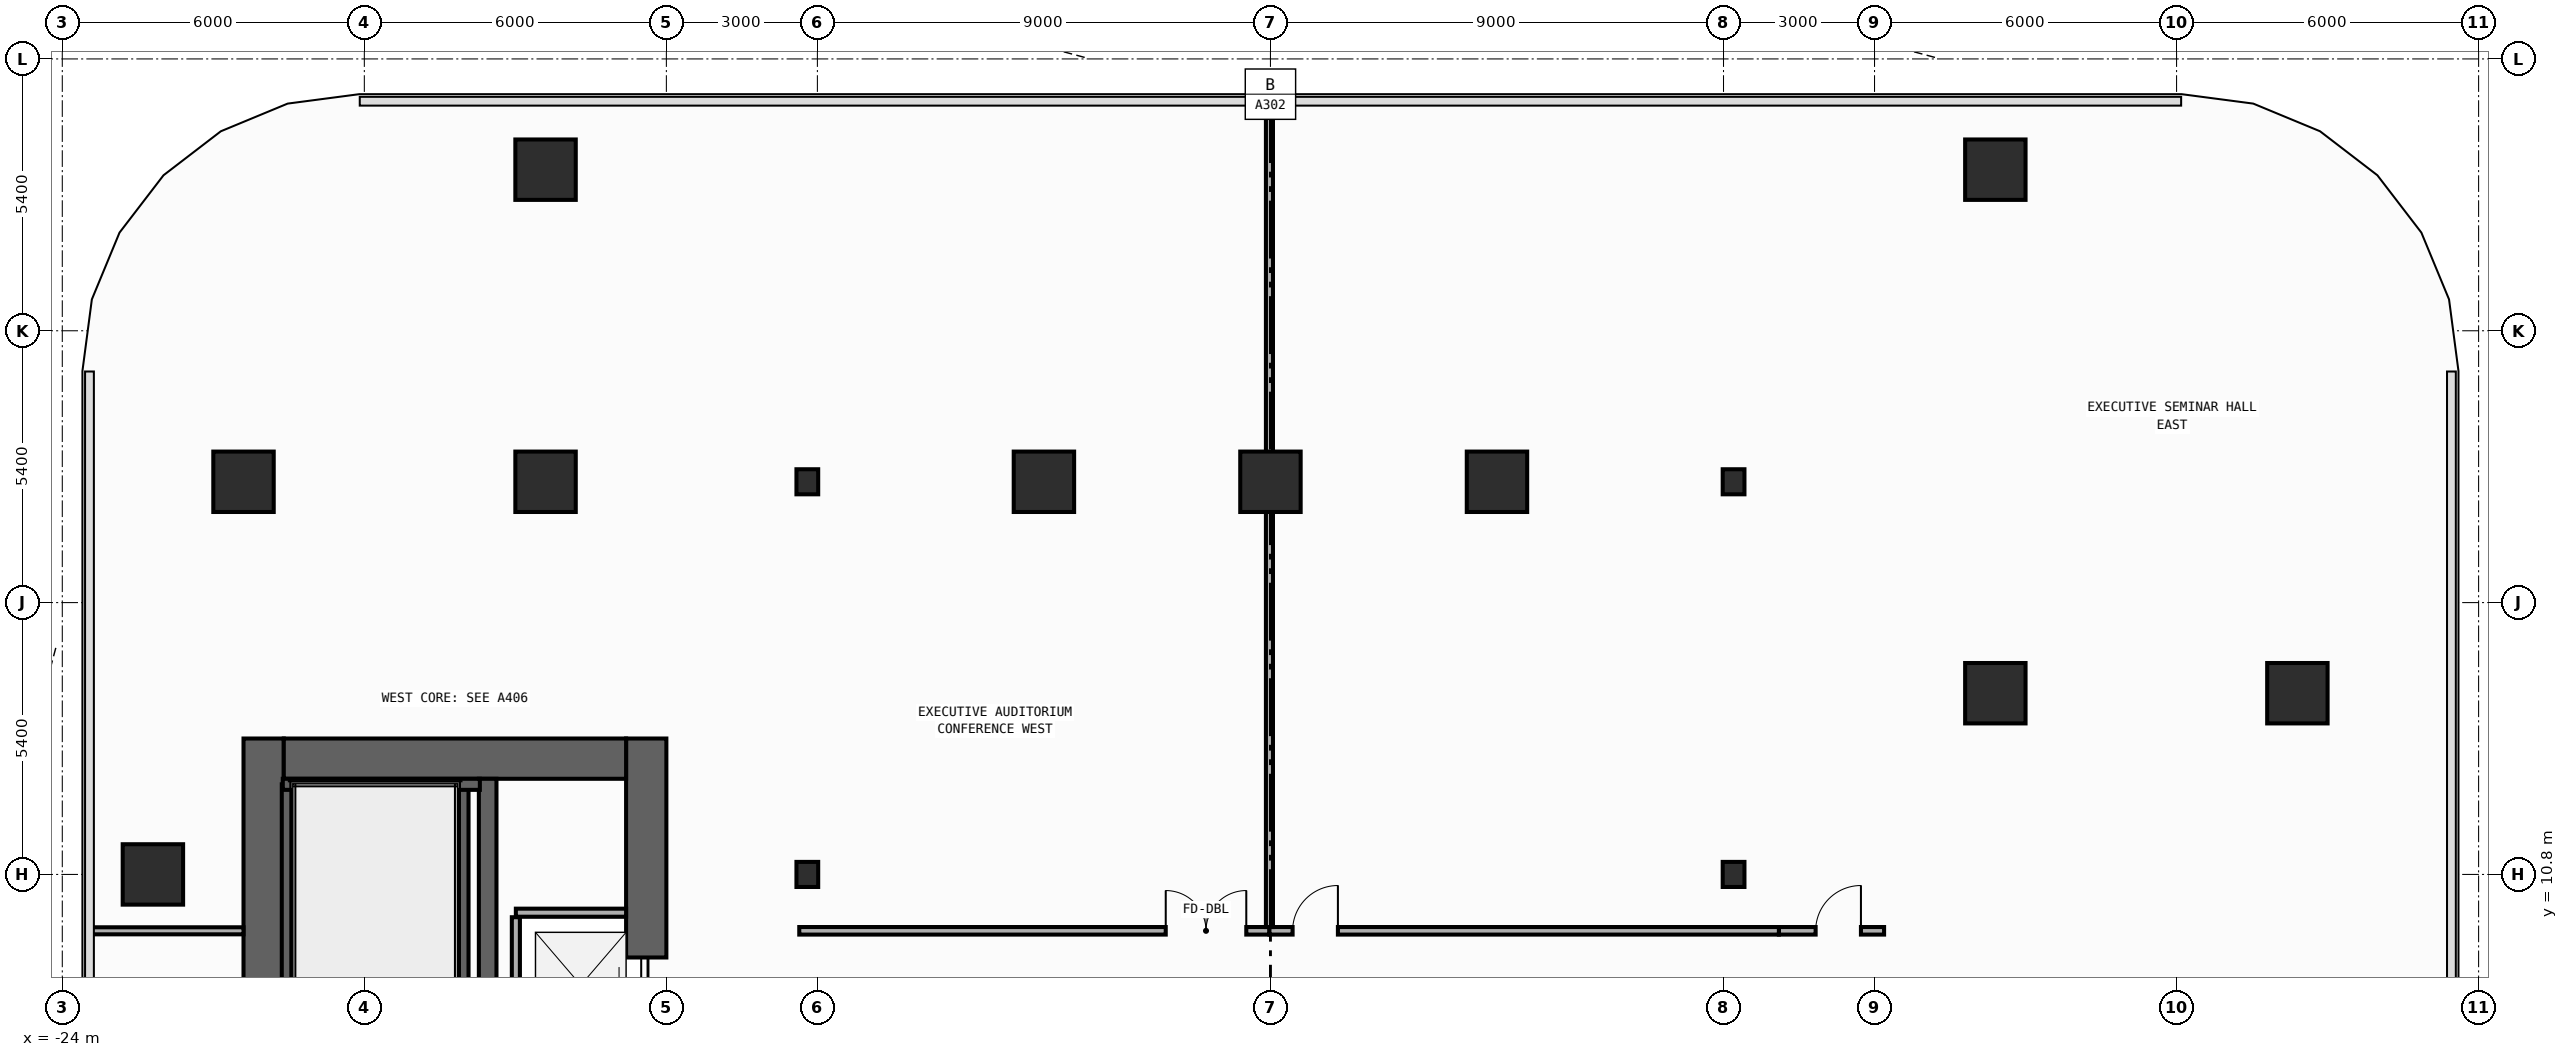
"""IFC4 building model, lengths in metres.
Left out: names, types, materials, properties, quantities, classifications, styles, units other than length and angle.
Written with IfcOpenShell. Run it as: python <this file> out.ifc"""

import sys

from ifc_helpers import new_model, si_unit, direction, frame, frame_2d, origin, origin_2d, place, context, subcontext, project, spatial, rectangle, i_section, extrude, element, fill, save


model = new_model("IFC4")
c1 = context("Model", 3, precision=1e-05, world=origin(), true_north=direction((0.0, 1.0)))
c2 = subcontext(c1, "Body", "Model", "MODEL_VIEW")
j1 = project(units=[si_unit("LENGTHUNIT", "METRE"), si_unit("PLANEANGLEUNIT", "RADIAN")], contexts=[c1])
p1 = place(None, origin())
s1 = spatial("IfcSite", under=j1, at=p1, CompositionType="ELEMENT")
p2 = place(p1, origin())
s2 = spatial("IfcBuilding", under=s1, at=p2, CompositionType="ELEMENT")
p3 = place(p2, frame((0.0, 0.0, 93.2)))
s3 = spatial("IfcBuildingStorey", under=s2, at=p3, CompositionType="ELEMENT", Elevation=93.2)
p4 = place(p3, frame((-20.0, -13.5, 0.0), z_axis=(0.0, 0.0, 1.0), x_axis=(0.0, 1.0, 0.0)))
e1 = element("IfcWall", 1, at=p4, inside=s3, PredefinedType="SHEAR", context=c2, shape_type="SweptSolid", body=[
    extrude(rectangle(XDim=27.0, YDim=0.8, at=frame_2d((13.5, 0.0))), origin(), (0.0, 0.0, 1.0), 3.94),
])
p5 = place(p3, frame((-12.4, -13.5, 0.0), z_axis=(0.0, 0.0, 1.0), x_axis=(0.0, 1.0, 0.0)))
e2 = element("IfcWall", 2, at=p5, inside=s3, PredefinedType="SHEAR", context=c2, shape_type="SweptSolid", body=[
    extrude(rectangle(XDim=27.0, YDim=0.8, at=frame_2d((13.5, 0.0))), origin(), (0.0, 0.0, 1.0), 3.94),
])
p6 = place(p5, frame((21.55, 0.0, 0.0)))
e3 = element("IfcOpeningElement", 3, at=p6, cuts=e2, PredefinedType="OPENING", context=c2, shape_type="SweptSolid", body=[
    extrude(rectangle(XDim=1.1, YDim=2.2, at=frame_2d((0.55, 1.1))), frame((0.0, 0.41, 0.0), z_axis=(0.0, -1.0, 0.0), x_axis=(1.0, 0.0, 0.0)), (0.0, 0.0, 1.0), 0.82),
])
p7 = place(p5, frame((18.35, 0.0, 0.0)))
e4 = element("IfcOpeningElement", 4, at=p7, cuts=e2, PredefinedType="OPENING", context=c2, shape_type="SweptSolid", body=[
    extrude(rectangle(XDim=1.1, YDim=2.2, at=frame_2d((0.55, 1.1))), frame((0.0, 0.41, 0.0), z_axis=(0.0, -1.0, 0.0), x_axis=(1.0, 0.0, 0.0)), (0.0, 0.0, 1.0), 0.82),
])
p8 = place(p5, frame((15.15, 0.0, 0.0)))
e5 = element("IfcOpeningElement", 5, at=p8, cuts=e2, PredefinedType="OPENING", context=c2, shape_type="SweptSolid", body=[
    extrude(rectangle(XDim=1.1, YDim=2.2, at=frame_2d((0.55, 1.1))), frame((0.0, 0.41, 0.0), z_axis=(0.0, -1.0, 0.0), x_axis=(1.0, 0.0, 0.0)), (0.0, 0.0, 1.0), 0.82),
])
p9 = place(p5, frame((10.35, 0.0, 0.0)))
e6 = element("IfcOpeningElement", 6, at=p9, cuts=e2, PredefinedType="OPENING", context=c2, shape_type="SweptSolid", body=[
    extrude(rectangle(XDim=1.1, YDim=2.2, at=frame_2d((0.55, 1.1))), frame((0.0, 0.41, 0.0), z_axis=(0.0, -1.0, 0.0), x_axis=(1.0, 0.0, 0.0)), (0.0, 0.0, 1.0), 0.82),
])
p10 = place(p5, frame((7.15, 0.0, 0.0)))
e7 = element("IfcOpeningElement", 7, at=p10, cuts=e2, PredefinedType="OPENING", context=c2, shape_type="SweptSolid", body=[
    extrude(rectangle(XDim=1.1, YDim=2.2, at=frame_2d((0.55, 1.1))), frame((0.0, 0.41, 0.0), z_axis=(0.0, -1.0, 0.0), x_axis=(1.0, 0.0, 0.0)), (0.0, 0.0, 1.0), 0.82),
])
p11 = place(p5, frame((3.95, 0.0, 0.0)))
e8 = element("IfcOpeningElement", 8, at=p11, cuts=e2, PredefinedType="OPENING", context=c2, shape_type="SweptSolid", body=[
    extrude(rectangle(XDim=1.1, YDim=2.2, at=frame_2d((0.55, 1.1))), frame((0.0, 0.41, 0.0), z_axis=(0.0, -1.0, 0.0), x_axis=(1.0, 0.0, 0.0)), (0.0, 0.0, 1.0), 0.82),
])
p12 = place(p5, frame((12.725, 0.0, 0.0)))
e9 = element("IfcOpeningElement", 9, at=p12, cuts=e2, PredefinedType="OPENING", context=c2, shape_type="SweptSolid", body=[
    extrude(rectangle(XDim=1.15, YDim=2.2, at=frame_2d((0.575, 1.1))), frame((0.0, 0.41, 0.0), z_axis=(0.0, -1.0, 0.0), x_axis=(1.0, 0.0, 0.0)), (0.0, 0.0, 1.0), 0.82),
])
p13 = place(p5, frame((1.625, 0.0, 0.0)))
e10 = element("IfcOpeningElement", 10, at=p13, cuts=e2, PredefinedType="OPENING", context=c2, shape_type="SweptSolid", body=[
    extrude(rectangle(XDim=0.85, YDim=2.1, at=frame_2d((0.425, 1.05))), frame((0.0, 0.41, 0.0), z_axis=(0.0, -1.0, 0.0), x_axis=(1.0, 0.0, 0.0)), (0.0, 0.0, 1.0), 0.82),
])
p14 = place(p3, frame((-19.6, 13.1, 0.0), z_axis=(0.0, 0.0, 1.0), x_axis=(1.0, 0.0, 0.0)))
e11 = element("IfcWall", 11, at=p14, inside=s3, PredefinedType="SHEAR", context=c2, shape_type="SweptSolid", body=[
    extrude(rectangle(XDim=6.8, YDim=0.8, at=frame_2d((3.4, 0.0))), origin(), (0.0, 0.0, 1.0), 3.94),
])
p15 = place(p3, frame((-15.55, -12.7, 0.0), z_axis=(0.0, 0.0, 1.0), x_axis=(0.0, 1.0, 0.0)))
e12 = element("IfcWall", 12, at=p15, inside=s3, PredefinedType="SHEAR", context=c2, shape_type="SweptSolid", body=[
    extrude(rectangle(XDim=25.4, YDim=0.35, at=frame_2d((12.7, 0.0))), origin(), (0.0, 0.0, 1.0), 3.94),
])
p16 = place(p15, frame((11.925, 0.0, 0.0)))
e13 = element("IfcOpeningElement", 13, at=p16, cuts=e12, PredefinedType="OPENING", context=c2, shape_type="SweptSolid", body=[
    extrude(rectangle(XDim=1.15, YDim=2.2, at=frame_2d((0.575, 1.1))), frame((0.0, 0.185, 0.0), z_axis=(0.0, -1.0, 0.0), x_axis=(1.0, 0.0, 0.0)), (0.0, 0.0, 1.0), 0.37),
])
p17 = place(p15, frame((0.825, 0.0, 0.0)))
e14 = element("IfcOpeningElement", 14, at=p17, cuts=e12, PredefinedType="OPENING", context=c2, shape_type="SweptSolid", body=[
    extrude(rectangle(XDim=0.85, YDim=2.1, at=frame_2d((0.425, 1.05))), frame((0.0, 0.185, 0.0), z_axis=(0.0, -1.0, 0.0), x_axis=(1.0, 0.0, 0.0)), (0.0, 0.0, 1.0), 0.37),
])
for number, where, z_axis, x_axis in (
    (15, (-16.04, 1.29, 0.0), (0.0, 0.0, 1.0), (0.0, 1.0, 0.0)),
    (16, (-19.53, 1.29, 0.0), (0.0, 0.0, 1.0), (0.0, 1.0, 0.0)),
):
    element("IfcWall", number, at=place(p3, frame(where, z_axis=z_axis, x_axis=x_axis)), inside=s3, PredefinedType="SHEAR", context=c2, shape_type="SweptSolid", body=[
        extrude(rectangle(XDim=11.3, YDim=0.22, at=frame_2d((5.65, 0.0))), origin(), (0.0, 0.0, 1.0), 3.94),
    ])
p18 = place(p3, frame((-19.62, 12.59, 0.0), z_axis=(0.0, 0.0, 1.0), x_axis=(1.0, 0.0, 0.0)))
e17 = element("IfcWall", 17, at=p18, inside=s3, PredefinedType="SHEAR", context=c2, shape_type="SweptSolid", body=[
    extrude(rectangle(XDim=3.915, YDim=0.22, at=frame_2d((1.958, 0.0))), origin(), (0.0, 0.0, 1.0), 3.94),
])
for number, where, z_axis, x_axis in (
    (18, (-9.2, 10.8, 0.0), (0.0, 0.0, 1.0), (1.0, 0.0, 0.0)),
    (19, (-9.2, 18.6, 0.0), (0.0, 0.0, 1.0), (1.0, 0.0, 0.0)),
    (20, (9.2, 10.8, 0.0), (0.0, 0.0, 1.0), (1.0, 0.0, 0.0)),
    (21, (9.2, 18.6, 0.0), (0.0, 0.0, 1.0), (1.0, 0.0, 0.0)),
):
    element("IfcColumn", number, at=place(p3, frame(where, z_axis=z_axis, x_axis=x_axis)), inside=s3, PredefinedType="COLUMN", context=c2, shape_type="SweptSolid", body=[
        extrude(i_section(OverallWidth=0.432, OverallDepth=0.498, WebThickness=0.045, FlangeThickness=0.07, FilletRadius=0.022, at=origin_2d()), origin(), (0.0, 0.0, 1.0), 4.2),
    ])
for number, where, z_axis, x_axis in (
    (22, (-20.4, 18.6, 0.0), (0.0, 0.0, 1.0), (1.0, 0.0, 0.0)),
    (23, (20.4, 14.4, 0.0), (0.0, 0.0, 1.0), (1.0, 0.0, 0.0)),
    (24, (-14.4, 18.6, 0.0), (0.0, 0.0, 1.0), (1.0, 0.0, 0.0)),
    (25, (14.4, 14.4, 0.0), (0.0, 0.0, 1.0), (1.0, 0.0, 0.0)),
    (26, (-4.5, 18.6, 0.0), (0.0, 0.0, 1.0), (1.0, 0.0, 0.0)),
    (27, (0.0, 18.6, 0.0), (0.0, 0.0, 1.0), (1.0, 0.0, 0.0)),
    (28, (4.5, 18.6, 0.0), (0.0, 0.0, 1.0), (1.0, 0.0, 0.0)),
    (29, (-22.2, 10.8, 0.0), (0.0, 0.0, 1.0), (1.0, 0.0, 0.0)),
    (30, (-14.4, 24.8, 0.0), (0.0, 0.0, 1.0), (1.0, 0.0, 0.0)),
    (31, (14.4, 24.8, 0.0), (0.0, 0.0, 1.0), (1.0, 0.0, 0.0)),
):
    element("IfcColumn", number, at=place(p3, frame(where, z_axis=z_axis, x_axis=x_axis)), inside=s3, PredefinedType="COLUMN", context=c2, shape_type="SweptSolid", body=[
        extrude(rectangle(XDim=1.2, YDim=1.2, at=origin_2d()), origin(), (0.0, 0.0, 1.0), 4.2),
    ])
p19 = place(p3, frame((-14.99, 10.04, 0.0), z_axis=(0.0, 0.0, 1.0), x_axis=(1.0, 0.0, 0.0)))
e32 = element("IfcWall", 32, at=p19, inside=s3, PredefinedType="STANDARD", context=c2, shape_type="SweptSolid", body=[
    extrude(rectangle(XDim=2.19, YDim=0.16, at=frame_2d((1.095, 0.0))), origin(), (0.0, 0.0, 1.0), 3.94),
])
p20 = place(p3, frame((-14.99, 7.25, 0.0), z_axis=(0.0, 0.0, 1.0), x_axis=(0.0, 1.0, 0.0)))
e33 = element("IfcWall", 33, at=p20, inside=s3, PredefinedType="STANDARD", context=c2, shape_type="SweptSolid", body=[
    extrude(rectangle(XDim=2.7, YDim=0.16, at=frame_2d((1.35, 0.0))), origin(), (0.0, 0.0, 1.0), 3.94),
])
p21 = place(p3, frame((10.1, 9.68, 0.0), z_axis=(0.0, 0.0, 1.0), x_axis=(1.0, 0.0, 0.0)))
e34 = element("IfcWall", 34, at=p21, inside=s3, PredefinedType="PARTITIONING", context=c2, shape_type="SweptSolid", body=[
    extrude(rectangle(XDim=2.09, YDim=0.15, at=frame_2d((1.045, 0.0))), origin(), (0.0, 0.0, 1.0), 3.94),
])
p22 = place(p21, frame((0.73, 0.0, 0.0)))
e35 = element("IfcOpeningElement", 35, at=p22, cuts=e34, PredefinedType="OPENING", context=c2, shape_type="SweptSolid", body=[
    extrude(rectangle(XDim=0.9, YDim=2.15, at=frame_2d((0.45, 1.075))), frame((0.0, 0.085, 0.0), z_axis=(0.0, -1.0, 0.0), x_axis=(1.0, 0.0, 0.0)), (0.0, 0.0, 1.0), 0.17),
])
p23 = place(p3, frame((-9.36, 9.68, 0.0), z_axis=(0.0, 0.0, 1.0), x_axis=(1.0, 0.0, 0.0)))
e36 = element("IfcWall", 36, at=p23, inside=s3, PredefinedType="PARTITIONING", context=c2, shape_type="SweptSolid", body=[
    extrude(rectangle(XDim=9.34, YDim=0.15, at=frame_2d((4.67, 0.0))), origin(), (0.0, 0.0, 1.0), 3.94),
])
p24 = place(p23, frame((7.28, 0.0, 0.0)))
e37 = element("IfcOpeningElement", 37, at=p24, cuts=e36, PredefinedType="OPENING", context=c2, shape_type="SweptSolid", body=[
    extrude(rectangle(XDim=1.6, YDim=2.25, at=frame_2d((0.8, 1.125))), frame((0.0, 0.085, 0.0), z_axis=(0.0, -1.0, 0.0), x_axis=(1.0, 0.0, 0.0)), (0.0, 0.0, 1.0), 0.17),
])
p25 = place(p3, frame((-0.02, 9.68, 0.0), z_axis=(0.0, 0.0, 1.0), x_axis=(1.0, 0.0, 0.0)))
e38 = element("IfcWall", 38, at=p25, inside=s3, PredefinedType="PARTITIONING", context=c2, shape_type="SweptSolid", body=[
    extrude(rectangle(XDim=10.12, YDim=0.15, at=frame_2d((5.06, 0.0))), origin(), (0.0, 0.0, 1.0), 3.94),
])
p26 = place(p25, frame((0.46, 0.0, 0.0)))
e39 = element("IfcOpeningElement", 39, at=p26, cuts=e38, PredefinedType="OPENING", context=c2, shape_type="SweptSolid", body=[
    extrude(rectangle(XDim=0.9, YDim=2.15, at=frame_2d((0.45, 1.075))), frame((0.0, 0.085, 0.0), z_axis=(0.0, -1.0, 0.0), x_axis=(1.0, 0.0, 0.0)), (0.0, 0.0, 1.0), 0.17),
])
p27 = place(p3, frame((-0.02, 9.755, 0.0), z_axis=(0.0, 0.0, 1.0), x_axis=(0.0, 1.0, 0.0)))
e40 = element("IfcWall", 40, at=p27, inside=s3, PredefinedType="PARTITIONING", context=c2, shape_type="SweptSolid", body=[
    extrude(rectangle(XDim=16.4, YDim=0.14, at=frame_2d((8.2, 0.0))), origin(), (0.0, 0.0, 1.0), 3.94),
])
p28 = place(p3, frame((-23.455, 9.68, 0.0), z_axis=(0.0, 0.0, 1.0), x_axis=(1.0, 0.0, 0.0)))
e41 = element("IfcWall", 41, at=p28, inside=s3, PredefinedType="PARTITIONING", context=c2, shape_type="SweptSolid", body=[
    extrude(rectangle(XDim=3.055, YDim=0.14, at=frame_2d((1.528, 0.0))), origin(), (0.0, 0.0, 1.0), 3.94),
])
p29 = place(p6, origin())
e42 = element("IfcDoor", 42, at=p29, inside=s3, OperationType="DOUBLE_DOOR_SLIDING", PredefinedType="DOOR", context=c2, shape_type="SweptSolid", body=[
    extrude(rectangle(XDim=1.1, YDim=2.2, at=frame_2d((0.55, 1.1))), frame((0.0, 0.025, 0.0), z_axis=(0.0, -1.0, 0.0), x_axis=(1.0, 0.0, 0.0)), (0.0, 0.0, 1.0), 0.05),
])
fill(e3, e42)
p30 = place(p22, origin())
e43 = element("IfcDoor", 43, at=p30, inside=s3, OperationType="SINGLE_SWING_RIGHT", PredefinedType="DOOR", context=c2, shape_type="SweptSolid", body=[
    extrude(rectangle(XDim=0.9, YDim=2.15, at=frame_2d((0.45, 1.075))), frame((0.0, 0.025, 0.0), z_axis=(0.0, -1.0, 0.0), x_axis=(1.0, 0.0, 0.0)), (0.0, 0.0, 1.0), 0.05),
])
fill(e35, e43)
p31 = place(p24, origin())
e44 = element("IfcDoor", 44, at=p31, inside=s3, OperationType="DOUBLE_DOOR_SINGLE_SWING", PredefinedType="DOOR", context=c2, shape_type="SweptSolid", body=[
    extrude(rectangle(XDim=1.6, YDim=2.25, at=frame_2d((0.8, 1.125))), frame((0.0, 0.025, 0.0), z_axis=(0.0, -1.0, 0.0), x_axis=(1.0, 0.0, 0.0)), (0.0, 0.0, 1.0), 0.05),
])
fill(e37, e44)
p32 = place(p26, origin())
e45 = element("IfcDoor", 45, at=p32, inside=s3, OperationType="SINGLE_SWING_RIGHT", PredefinedType="DOOR", context=c2, shape_type="SweptSolid", body=[
    extrude(rectangle(XDim=0.9, YDim=2.15, at=frame_2d((0.45, 1.075))), frame((0.0, 0.025, 0.0), z_axis=(0.0, -1.0, 0.0), x_axis=(1.0, 0.0, 0.0)), (0.0, 0.0, 1.0), 0.05),
])
fill(e39, e45)
save(model, sys.argv[1])
